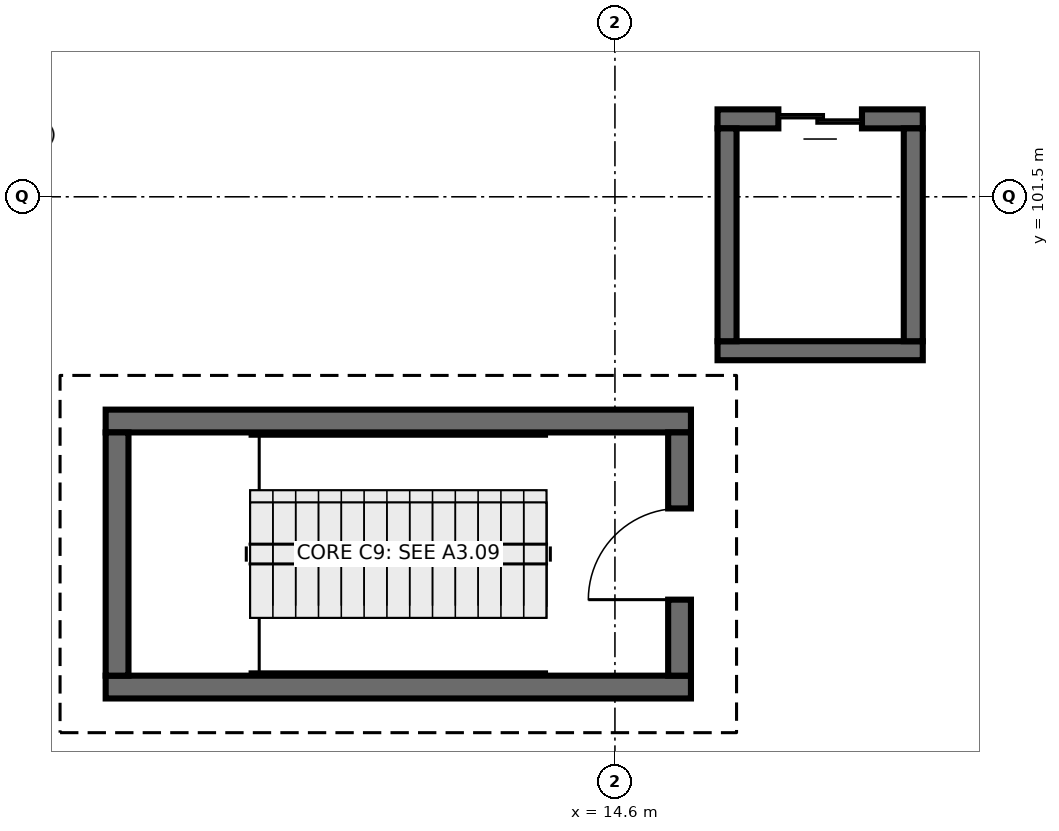
"""IFC4 building model, lengths in metres.
Left out: names, types, materials, properties, quantities, classifications, styles, units other than length and angle.
Written with IfcOpenShell. Run it as: python <this file> out.ifc"""

import sys

from ifc_helpers import new_model, si_unit, direction, frame, frame_2d, origin, place, context, subcontext, project, spatial, rectangle, extrude, element, fill, save


model = new_model("IFC4")
c1 = context("Model", 3, precision=1e-05, world=origin(), true_north=direction((0.0, 1.0)))
c2 = subcontext(c1, "Body", "Model", "MODEL_VIEW")
j1 = project(units=[si_unit("LENGTHUNIT", "METRE"), si_unit("PLANEANGLEUNIT", "RADIAN")], contexts=[c1])
p1 = place(None, origin())
s1 = spatial("IfcSite", under=j1, at=p1, CompositionType="ELEMENT")
p2 = place(p1, origin())
s2 = spatial("IfcBuilding", under=s1, at=p2, CompositionType="ELEMENT")
p3 = place(p2, frame((0.0, 0.0, -5.0)))
s3 = spatial("IfcBuildingStorey", under=s2, at=p3, CompositionType="ELEMENT", Elevation=-5.0)
for number, where, z_axis, x_axis in (
    (1, (7.9, 95.05, 0.0), (0.0, 0.0, 1.0), (1.0, 0.0, 0.0)),
    (2, (15.6, 98.55, 0.0), (0.0, 0.0, 1.0), (-1.0, 0.0, 0.0)),
):
    element("IfcWall", number, at=place(p3, frame(where, z_axis=z_axis, x_axis=x_axis)), inside=s3, PredefinedType="SHEAR", context=c2, shape_type="SweptSolid", body=[
        extrude(rectangle(XDim=7.7, YDim=0.3, at=frame_2d((3.85, 0.0))), origin(), (0.0, 0.0, 1.0), 5.0),
    ])
p4 = place(p3, frame((8.05, 98.4, 0.0), z_axis=(0.0, 0.0, 1.0), x_axis=(0.0, -1.0, 0.0)))
e3 = element("IfcWall", 3, at=p4, inside=s3, PredefinedType="SHEAR", context=c2, shape_type="SweptSolid", body=[
    extrude(rectangle(XDim=3.2, YDim=0.3, at=frame_2d((1.6, 0.0))), origin(), (0.0, 0.0, 1.0), 5.0),
])
p5 = place(p3, frame((15.45, 95.2, 0.0), z_axis=(0.0, 0.0, 1.0), x_axis=(0.0, 1.0, 0.0)))
e4 = element("IfcWall", 4, at=p5, inside=s3, PredefinedType="SHEAR", context=c2, shape_type="SweptSolid", body=[
    extrude(rectangle(XDim=3.2, YDim=0.3, at=frame_2d((1.6, 0.0))), origin(), (0.0, 0.0, 1.0), 5.0),
])
p6 = place(p5, frame((1.0, 0.0, 0.0)))
e5 = element("IfcOpeningElement", 5, at=p6, cuts=e4, PredefinedType="OPENING", context=c2, shape_type="SweptSolid", body=[
    extrude(rectangle(XDim=1.2, YDim=2.15, at=frame_2d((0.6, 1.075))), frame((0.0, 0.16, 0.0), z_axis=(0.0, -1.0, 0.0), x_axis=(1.0, 0.0, 0.0)), (0.0, 0.0, 1.0), 0.32),
])
p7 = place(p3, frame((15.95, 99.475, 0.0), z_axis=(0.0, 0.0, 1.0), x_axis=(1.0, 0.0, 0.0)))
e6 = element("IfcWall", 6, at=p7, inside=s3, PredefinedType="SHEAR", context=c2, shape_type="SweptSolid", body=[
    extrude(rectangle(XDim=2.7, YDim=0.25, at=frame_2d((1.35, 0.0))), origin(), (0.0, 0.0, 1.0), 5.0),
])
p8 = place(p3, frame((18.65, 102.525, 0.0), z_axis=(0.0, 0.0, 1.0), x_axis=(-1.0, 0.0, 0.0)))
e7 = element("IfcWall", 7, at=p8, inside=s3, PredefinedType="SHEAR", context=c2, shape_type="SweptSolid", body=[
    extrude(rectangle(XDim=2.7, YDim=0.25, at=frame_2d((1.35, 0.0))), origin(), (0.0, 0.0, 1.0), 5.0),
])
p9 = place(p8, frame((0.8, 0.0, 0.0)))
e8 = element("IfcOpeningElement", 8, at=p9, cuts=e7, PredefinedType="OPENING", context=c2, shape_type="SweptSolid", body=[
    extrude(rectangle(XDim=1.1, YDim=2.15, at=frame_2d((0.55, 1.075))), frame((0.0, 0.135, 0.0), z_axis=(0.0, -1.0, 0.0), x_axis=(1.0, 0.0, 0.0)), (0.0, 0.0, 1.0), 0.27),
])
for number, where, z_axis, x_axis in (
    (9, (16.075, 102.4, 0.0), (0.0, 0.0, 1.0), (0.0, -1.0, 0.0)),
    (10, (18.525, 99.6, 0.0), (0.0, 0.0, 1.0), (0.0, 1.0, 0.0)),
):
    element("IfcWall", number, at=place(p3, frame(where, z_axis=z_axis, x_axis=x_axis)), inside=s3, PredefinedType="SHEAR", context=c2, shape_type="SweptSolid", body=[
        extrude(rectangle(XDim=2.8, YDim=0.25, at=frame_2d((1.4, 0.0))), origin(), (0.0, 0.0, 1.0), 5.0),
    ])
p10 = place(p6, origin())
e11 = element("IfcDoor", 11, at=p10, inside=s3, OperationType="SINGLE_SWING_LEFT", PredefinedType="DOOR", context=c2, shape_type="SweptSolid", body=[
    extrude(rectangle(XDim=1.2, YDim=2.15, at=frame_2d((0.6, 1.075))), frame((0.0, 0.025, 0.0), z_axis=(0.0, -1.0, 0.0), x_axis=(1.0, 0.0, 0.0)), (0.0, 0.0, 1.0), 0.05),
])
fill(e5, e11)
p11 = place(p9, origin())
e12 = element("IfcDoor", 12, at=p11, inside=s3, OperationType="DOUBLE_DOOR_SLIDING", PredefinedType="DOOR", context=c2, shape_type="SweptSolid", body=[
    extrude(rectangle(XDim=1.1, YDim=2.15, at=frame_2d((0.55, 1.075))), frame((0.0, 0.025, 0.0), z_axis=(0.0, -1.0, 0.0), x_axis=(1.0, 0.0, 0.0)), (0.0, 0.0, 1.0), 0.05),
])
fill(e8, e12)
save(model, sys.argv[1])
